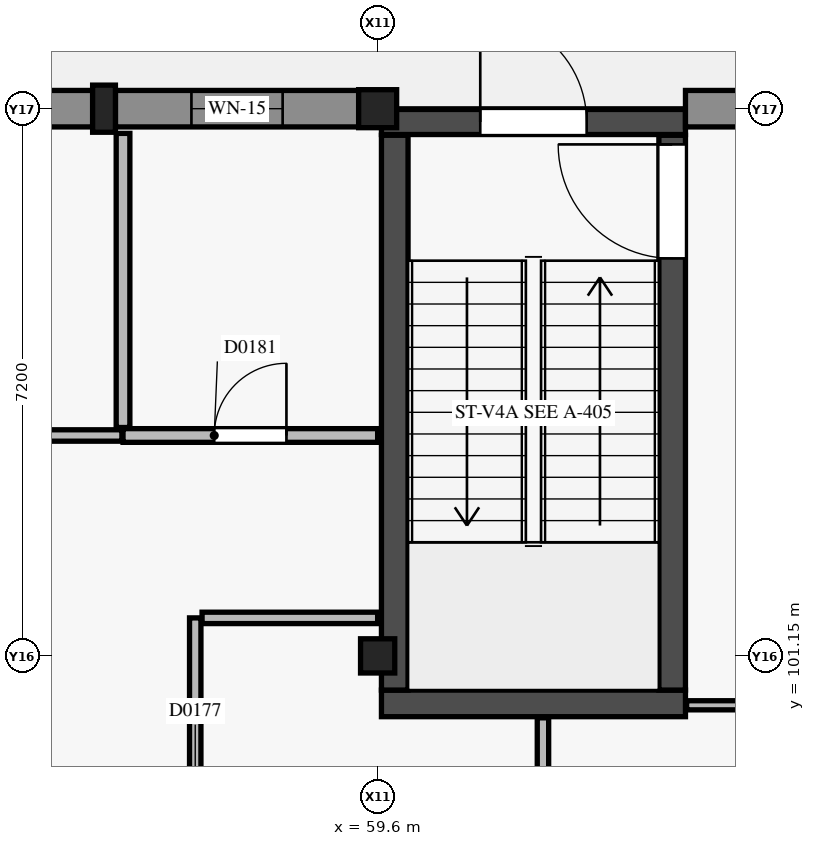
"""IFC4 building model, lengths in metres.
Left out: names, types, materials, properties, quantities, classifications, styles, units other than length and angle.
Written with IfcOpenShell. Run it as: python <this file> out.ifc"""

import sys

from ifc_helpers import new_model, si_unit, direction, frame, frame_2d, origin, origin_2d, place, context, subcontext, project, spatial, rectangle, circle, extrude, element, fill, save


model = new_model("IFC4")
c1 = context("Model", 3, precision=1e-05, world=origin(), true_north=direction((0.0, 1.0)))
c2 = subcontext(c1, "Body", "Model", "MODEL_VIEW")
j1 = project(units=[si_unit("LENGTHUNIT", "METRE"), si_unit("PLANEANGLEUNIT", "RADIAN")], contexts=[c1])
p1 = place(None, origin())
s1 = spatial("IfcSite", under=j1, at=p1, CompositionType="ELEMENT")
p2 = place(p1, origin())
s2 = spatial("IfcBuilding", under=s1, at=p2, CompositionType="ELEMENT")
p3 = place(p2, origin())
s3 = spatial("IfcBuildingStorey", under=s2, at=p3, CompositionType="ELEMENT", Elevation=0.0)
p4 = place(p3, frame((59.6, 101.15, 0.0), z_axis=(0.0, 0.0, 1.0), x_axis=(1.0, 0.0, 0.0)))
e1 = element("IfcColumn", 1, at=p4, inside=s3, PredefinedType="COLUMN", context=c2, shape_type="SweptSolid", body=[
    extrude(rectangle(XDim=0.45, YDim=0.45, at=origin_2d()), origin(), (0.0, 0.0, 1.0), 4.8),
])
p5 = place(p3, frame((59.6, 108.35, 0.0), z_axis=(0.0, 0.0, 1.0), x_axis=(1.0, 0.0, 0.0)))
e2 = element("IfcColumn", 2, at=p5, inside=s3, PredefinedType="COLUMN", context=c2, shape_type="SweptSolid", body=[
    extrude(circle(Radius=0.25, at=origin_2d()), origin(), (0.0, 0.0, 1.0), 4.8),
])
p6 = place(p3, frame((56.0, 108.35, 0.0), z_axis=(0.0, 0.0, 1.0), x_axis=(1.0, 0.0, 0.0)))
e3 = element("IfcColumn", 3, at=p6, inside=s3, PredefinedType="PILASTER", context=c2, shape_type="SweptSolid", body=[
    extrude(rectangle(XDim=0.3, YDim=0.62, at=origin_2d()), origin(), (0.0, 0.0, 1.0), 4.8),
])
p7 = place(p3, frame((59.65, 100.525, 0.0), z_axis=(0.0, 0.0, 1.0), x_axis=(1.0, 0.0, 0.0)))
e4 = element("IfcWall", 4, at=p7, inside=s3, PredefinedType="SHEAR", context=c2, shape_type="SweptSolid", body=[
    extrude(rectangle(XDim=4.0, YDim=0.35, at=frame_2d((2.0, 0.0))), origin(), (0.0, 0.0, 1.0), 4.55),
])
p8 = place(p3, frame((59.65, 108.175, 0.0), z_axis=(0.0, 0.0, 1.0), x_axis=(1.0, 0.0, 0.0)))
e5 = element("IfcWall", 5, at=p8, inside=s3, PredefinedType="SHEAR", context=c2, shape_type="SweptSolid", body=[
    extrude(rectangle(XDim=4.0, YDim=0.33, at=frame_2d((2.0, 0.0))), origin(), (0.0, 0.0, 1.0), 4.55),
])
p9 = place(p8, frame((1.3, 0.0, 0.0)))
e6 = element("IfcOpeningElement", 6, at=p9, cuts=e5, PredefinedType="OPENING", context=c2, shape_type="SweptSolid", body=[
    extrude(rectangle(XDim=1.4, YDim=2.25, at=frame_2d((0.7, 1.125))), frame((0.0, 0.175, 0.0), z_axis=(0.0, -1.0, 0.0), x_axis=(1.0, 0.0, 0.0)), (0.0, 0.0, 1.0), 0.35),
])
p10 = place(p3, frame((59.825, 100.7, 0.0), z_axis=(0.0, 0.0, 1.0), x_axis=(0.0, 1.0, 0.0)))
e7 = element("IfcWall", 7, at=p10, inside=s3, PredefinedType="SHEAR", context=c2, shape_type="SweptSolid", body=[
    extrude(rectangle(XDim=7.3, YDim=0.35, at=frame_2d((3.65, 0.0))), origin(), (0.0, 0.0, 1.0), 4.55),
])
p11 = place(p3, frame((63.475, 100.7, 0.0), z_axis=(0.0, 0.0, 1.0), x_axis=(0.0, 1.0, 0.0)))
e8 = element("IfcWall", 8, at=p11, inside=s3, PredefinedType="SHEAR", context=c2, shape_type="SweptSolid", body=[
    extrude(rectangle(XDim=7.3, YDim=0.35, at=frame_2d((3.65, 0.0))), origin(), (0.0, 0.0, 1.0), 4.55),
])
p12 = place(p11, frame((5.68, 0.0, 0.0)))
e9 = element("IfcOpeningElement", 9, at=p12, cuts=e8, PredefinedType="OPENING", context=c2, shape_type="SweptSolid", body=[
    extrude(rectangle(XDim=1.5, YDim=2.15, at=frame_2d((0.75, 1.075))), frame((0.0, 0.185, 0.0), z_axis=(0.0, -1.0, 0.0), x_axis=(1.0, 0.0, 0.0)), (0.0, 0.0, 1.0), 0.37),
])
p13 = place(p3, frame((52.7, 108.35, 0.0), z_axis=(0.0, 0.0, 1.0), x_axis=(1.0, 0.0, 0.0)))
e10 = element("IfcWall", 10, at=p13, inside=s3, PredefinedType="SOLIDWALL", context=c2, shape_type="SweptSolid", body=[
    extrude(rectangle(XDim=3.15, YDim=0.48, at=frame_2d((1.575, 0.0))), origin(), (0.0, 0.0, 1.0), 3.73),
])
p14 = place(p13, frame((0.675, 0.0, 0.9)))
e11 = element("IfcOpeningElement", 11, at=p14, cuts=e10, PredefinedType="OPENING", context=c2, shape_type="SweptSolid", body=[
    extrude(rectangle(XDim=1.8, YDim=1.5, at=frame_2d((0.9, 0.75))), frame((0.0, 0.25, 0.0), z_axis=(0.0, -1.0, 0.0), x_axis=(1.0, 0.0, 0.0)), (0.0, 0.0, 1.0), 0.5),
])
p15 = place(p3, frame((56.15, 108.35, 0.0), z_axis=(0.0, 0.0, 1.0), x_axis=(1.0, 0.0, 0.0)))
e12 = element("IfcWall", 12, at=p15, inside=s3, PredefinedType="SOLIDWALL", context=c2, shape_type="SweptSolid", body=[
    extrude(rectangle(XDim=3.2, YDim=0.48, at=frame_2d((1.6, 0.0))), origin(), (0.0, 0.0, 1.0), 3.73),
])
p16 = place(p15, frame((1.0, 0.0, 0.6)))
e13 = element("IfcOpeningElement", 13, at=p16, cuts=e12, PredefinedType="OPENING", context=c2, shape_type="SweptSolid", body=[
    extrude(rectangle(XDim=1.2, YDim=2.2, at=frame_2d((0.6, 1.1))), frame((0.0, 0.25, 0.0), z_axis=(0.0, -1.0, 0.0), x_axis=(1.0, 0.0, 0.0)), (0.0, 0.0, 1.0), 0.5),
])
p17 = place(p3, frame((63.65, 108.35, 0.0), z_axis=(0.0, 0.0, 1.0), x_axis=(1.0, 0.0, 0.0)))
e14 = element("IfcWall", 14, at=p17, inside=s3, PredefinedType="SOLIDWALL", context=c2, shape_type="SweptSolid", body=[
    extrude(rectangle(XDim=2.8, YDim=0.48, at=frame_2d((1.4, 0.0))), origin(), (0.0, 0.0, 1.0), 3.73),
])
p18 = place(p17, frame((0.69, 0.0, 0.95)))
e15 = element("IfcOpeningElement", 15, at=p18, cuts=e14, PredefinedType="OPENING", context=c2, shape_type="SweptSolid", body=[
    extrude(rectangle(XDim=0.9, YDim=1.2, at=frame_2d((0.45, 0.6))), frame((0.0, 0.25, 0.0), z_axis=(0.0, -1.0, 0.0), x_axis=(1.0, 0.0, 0.0)), (0.0, 0.0, 1.0), 0.5),
])
p19 = place(p3, frame((56.25, 104.05, 0.0), z_axis=(0.0, 0.0, 1.0), x_axis=(1.0, 0.0, 0.0)))
e16 = element("IfcWall", 16, at=p19, inside=s3, PredefinedType="PLUMBINGWALL", context=c2, shape_type="SweptSolid", body=[
    extrude(rectangle(XDim=3.35, YDim=0.18, at=frame_2d((1.675, 0.0))), origin(), (0.0, 0.0, 1.0), 4.015),
])
p20 = place(p19, frame((1.2, 0.0, 0.0)))
e17 = element("IfcOpeningElement", 17, at=p20, cuts=e16, PredefinedType="OPENING", context=c2, shape_type="SweptSolid", body=[
    extrude(rectangle(XDim=0.95, YDim=2.1, at=frame_2d((0.475, 1.05))), frame((0.0, 0.1, 0.0), z_axis=(0.0, -1.0, 0.0), x_axis=(1.0, 0.0, 0.0)), (0.0, 0.0, 1.0), 0.2),
])
p21 = place(p3, frame((54.89, 104.05, 0.0), z_axis=(0.0, 0.0, 1.0), x_axis=(1.0, 0.0, 0.0)))
e18 = element("IfcWall", 18, at=p21, inside=s3, PredefinedType="PARTITIONING", context=c2, shape_type="SweptSolid", body=[
    extrude(rectangle(XDim=1.345, YDim=0.15, at=frame_2d((0.673, 0.0))), origin(), (0.0, 0.0, 1.0), 4.55),
])
p22 = place(p3, frame((57.2, 96.29, 0.0), z_axis=(0.0, 0.0, 1.0), x_axis=(0.0, 1.0, 0.0)))
e19 = element("IfcWall", 19, at=p22, inside=s3, PredefinedType="PARTITIONING", context=c2, shape_type="SweptSolid", body=[
    extrude(rectangle(XDim=5.36, YDim=0.15, at=frame_2d((2.68, 0.0))), origin(), (0.0, 0.0, 1.0), 3.955),
])
p23 = place(p22, frame((2.105, 0.0, 0.0)))
e20 = element("IfcOpeningElement", 20, at=p23, cuts=e19, PredefinedType="OPENING", context=c2, shape_type="SweptSolid", body=[
    extrude(rectangle(XDim=1.15, YDim=2.15, at=frame_2d((0.575, 1.075))), frame((0.0, 0.085, 0.0), z_axis=(0.0, -1.0, 0.0), x_axis=(1.0, 0.0, 0.0)), (0.0, 0.0, 1.0), 0.17),
])
p24 = place(p3, frame((57.29, 101.65, 0.0), z_axis=(0.0, 0.0, 1.0), x_axis=(1.0, 0.0, 0.0)))
e21 = element("IfcWall", 21, at=p24, inside=s3, PredefinedType="PARTITIONING", context=c2, shape_type="SweptSolid", body=[
    extrude(rectangle(XDim=2.31, YDim=0.15, at=frame_2d((1.155, 0.0))), origin(), (0.0, 0.0, 1.0), 4.015),
])
p25 = place(p3, frame((63.665, 100.5, 0.0), z_axis=(0.0, 0.0, 1.0), x_axis=(1.0, 0.0, 0.0)))
e22 = element("IfcWall", 22, at=p25, inside=s3, PredefinedType="PARTITIONING", context=c2, shape_type="SweptSolid", body=[
    extrude(rectangle(XDim=2.285, YDim=0.12, at=frame_2d((1.143, 0.0))), origin(), (0.0, 0.0, 1.0), 4.55),
])
p26 = place(p3, frame((56.25, 104.155, 0.0), z_axis=(0.0, 0.0, 1.0), x_axis=(0.0, 1.0, 0.0)))
e23 = element("IfcWall", 23, at=p26, inside=s3, PredefinedType="PLUMBINGWALL", context=c2, shape_type="SweptSolid", body=[
    extrude(rectangle(XDim=3.87, YDim=0.18, at=frame_2d((1.935, 0.0))), origin(), (0.0, 0.0, 1.0), 4.075),
])
p27 = place(p3, frame((61.775, 98.965, 0.0), z_axis=(0.0, 0.0, 1.0), x_axis=(0.0, 1.0, 0.0)))
e24 = element("IfcWall", 24, at=p27, inside=s3, PredefinedType="PARTITIONING", context=c2, shape_type="SweptSolid", body=[
    extrude(rectangle(XDim=1.37, YDim=0.15, at=frame_2d((0.685, 0.0))), origin(), (0.0, 0.0, 1.0), 4.55),
])
p28 = place(p9, origin())
e25 = element("IfcDoor", 25, at=p28, inside=s3, OperationType="SINGLE_SWING_LEFT", PredefinedType="DOOR", context=c2, shape_type="SweptSolid", body=[
    extrude(rectangle(XDim=1.4, YDim=2.25, at=frame_2d((0.7, 1.125))), frame((0.0, 0.025, 0.0), z_axis=(0.0, -1.0, 0.0), x_axis=(1.0, 0.0, 0.0)), (0.0, 0.0, 1.0), 0.05),
])
fill(e6, e25)
p29 = place(p16, origin())
e26 = element("IfcWindow", 26, at=p29, inside=s3, PartitioningType="SINGLE_PANEL", PredefinedType="WINDOW", context=c2, shape_type="SweptSolid", body=[
    extrude(rectangle(XDim=1.2, YDim=2.2, at=frame_2d((0.6, 1.1))), frame((0.0, 0.03, 0.0), z_axis=(0.0, -1.0, 0.0), x_axis=(1.0, 0.0, 0.0)), (0.0, 0.0, 1.0), 0.06),
])
fill(e13, e26)
p30 = place(p12, origin())
e27 = element("IfcDoor", 27, at=p30, inside=s3, OperationType="SINGLE_SWING_RIGHT", PredefinedType="DOOR", context=c2, shape_type="SweptSolid", body=[
    extrude(rectangle(XDim=1.5, YDim=2.15, at=frame_2d((0.75, 1.075))), frame((0.0, 0.025, 0.0), z_axis=(0.0, -1.0, 0.0), x_axis=(1.0, 0.0, 0.0)), (0.0, 0.0, 1.0), 0.05),
])
fill(e9, e27)
p31 = place(p20, origin())
e28 = element("IfcDoor", 28, at=p31, inside=s3, OperationType="SINGLE_SWING_RIGHT", PredefinedType="DOOR", context=c2, shape_type="SweptSolid", body=[
    extrude(rectangle(XDim=0.95, YDim=2.1, at=frame_2d((0.475, 1.05))), frame((0.0, 0.025, 0.0), z_axis=(0.0, -1.0, 0.0), x_axis=(1.0, 0.0, 0.0)), (0.0, 0.0, 1.0), 0.05),
])
fill(e17, e28)
save(model, sys.argv[1])
